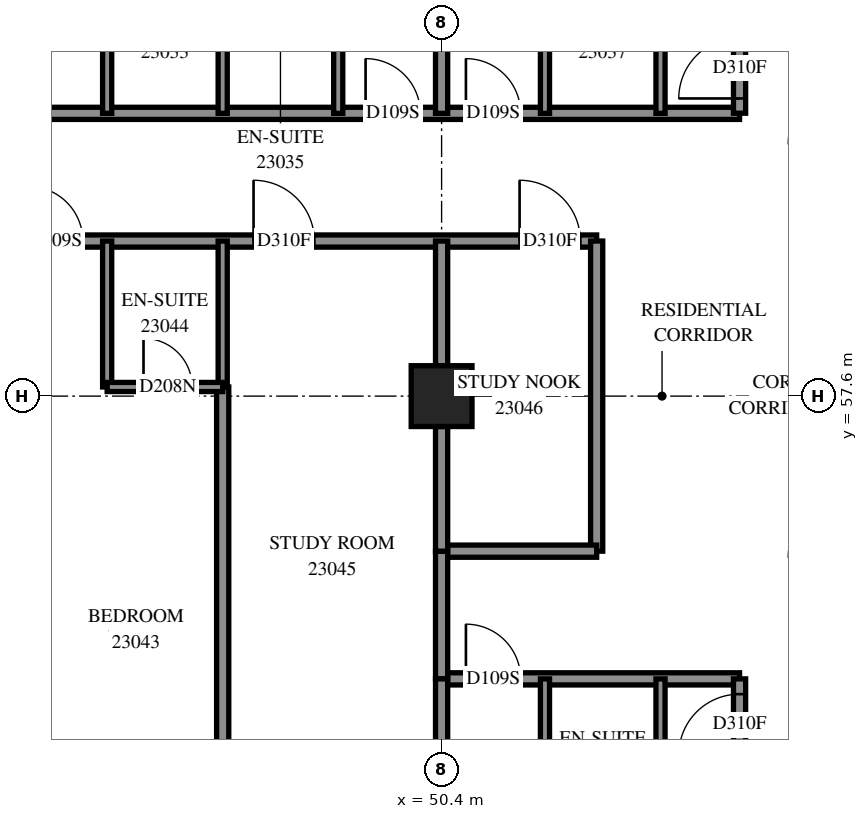
"""IFC4 building model, lengths in metres.
Left out: names, types, materials, properties, quantities, classifications, styles, units other than length and angle.
Written with IfcOpenShell. Run it as: python <this file> out.ifc"""

import sys

from ifc_helpers import new_model, si_unit, direction, frame, frame_2d, origin, origin_2d, place, context, subcontext, project, spatial, rectangle, extrude, element, fill, save


model = new_model("IFC4")
c1 = context("Model", 3, precision=1e-05, world=origin(), true_north=direction((0.0, 1.0)))
c2 = subcontext(c1, "Body", "Model", "MODEL_VIEW")
j1 = project(units=[si_unit("LENGTHUNIT", "METRE"), si_unit("PLANEANGLEUNIT", "RADIAN")], contexts=[c1])
p1 = place(None, origin())
s1 = spatial("IfcSite", under=j1, at=p1, CompositionType="ELEMENT")
p2 = place(p1, origin())
s2 = spatial("IfcBuilding", under=s1, at=p2, CompositionType="ELEMENT")
p3 = place(p2, frame((0.0, 0.0, 88.0)))
s3 = spatial("IfcBuildingStorey", under=s2, at=p3, CompositionType="ELEMENT", Elevation=88.0)
p4 = place(p3, frame((50.4, 57.6, 0.0), z_axis=(0.0, 0.0, 1.0), x_axis=(1.0, 0.0, 0.0)))
e1 = element("IfcColumn", 1, at=p4, inside=s3, PredefinedType="COLUMN", context=c2, shape_type="SweptSolid", body=[
    extrude(rectangle(XDim=1.0, YDim=1.0, at=origin_2d()), origin(), (0.0, 0.0, 1.0), 3.1),
])
p5 = place(p3, frame((28.8, 60.15, 0.0), z_axis=(0.0, 0.0, 1.0), x_axis=(1.0, 0.0, 0.0)))
e2 = element("IfcWall", 2, at=p5, inside=s3, PredefinedType="PARTITIONING", context=c2, shape_type="SweptSolid", body=[
    extrude(rectangle(XDim=24.15, YDim=0.2, at=frame_2d((12.075, 0.0))), origin(), (0.0, 0.0, 1.0), 3.1),
])
p6 = place(p5, frame((11.325, 0.0, 0.0)))
e3 = element("IfcOpeningElement", 3, at=p6, cuts=e2, PredefinedType="OPENING", context=c2, shape_type="SweptSolid", body=[
    extrude(rectangle(XDim=1.0, YDim=2.1, at=frame_2d((0.5, 1.05))), frame((0.0, 0.11, 0.0), z_axis=(0.0, -1.0, 0.0), x_axis=(1.0, 0.0, 0.0)), (0.0, 0.0, 1.0), 0.22),
])
p7 = place(p5, frame((14.8, 0.0, 0.0)))
e4 = element("IfcOpeningElement", 4, at=p7, cuts=e2, PredefinedType="OPENING", context=c2, shape_type="SweptSolid", body=[
    extrude(rectangle(XDim=0.9, YDim=2.1, at=frame_2d((0.45, 1.05))), frame((0.0, 0.11, 0.0), z_axis=(0.0, -1.0, 0.0), x_axis=(1.0, 0.0, 0.0)), (0.0, 0.0, 1.0), 0.22),
])
p8 = place(p5, frame((18.508, 0.0, 0.0)))
e5 = element("IfcOpeningElement", 5, at=p8, cuts=e2, PredefinedType="OPENING", context=c2, shape_type="SweptSolid", body=[
    extrude(rectangle(XDim=1.0, YDim=2.1, at=frame_2d((0.5, 1.05))), frame((0.0, 0.11, 0.0), z_axis=(0.0, -1.0, 0.0), x_axis=(1.0, 0.0, 0.0)), (0.0, 0.0, 1.0), 0.22),
])
p9 = place(p5, frame((22.882, 0.0, 0.0)))
e6 = element("IfcOpeningElement", 6, at=p9, cuts=e2, PredefinedType="OPENING", context=c2, shape_type="SweptSolid", body=[
    extrude(rectangle(XDim=1.0, YDim=2.1, at=frame_2d((0.5, 1.05))), frame((0.0, 0.11, 0.0), z_axis=(0.0, -1.0, 0.0), x_axis=(1.0, 0.0, 0.0)), (0.0, 0.0, 1.0), 0.22),
])
p10 = place(p3, frame((33.45, 62.25, 0.0), z_axis=(0.0, 0.0, 1.0), x_axis=(1.0, 0.0, 0.0)))
e7 = element("IfcWall", 7, at=p10, inside=s3, PredefinedType="PARTITIONING", context=c2, shape_type="SweptSolid", body=[
    extrude(rectangle(XDim=21.85, YDim=0.2, at=frame_2d((10.925, 0.0))), origin(), (0.0, 0.0, 1.0), 3.1),
])
p11 = place(p10, frame((0.144, 0.0, 0.0)))
e8 = element("IfcOpeningElement", 8, at=p11, cuts=e7, PredefinedType="OPENING", context=c2, shape_type="SweptSolid", body=[
    extrude(rectangle(XDim=1.0, YDim=2.1, at=frame_2d((0.5, 1.05))), frame((0.0, 0.11, 0.0), z_axis=(0.0, -1.0, 0.0), x_axis=(1.0, 0.0, 0.0)), (0.0, 0.0, 1.0), 0.22),
])
p12 = place(p10, frame((2.95, 0.0, 0.0)))
e9 = element("IfcOpeningElement", 9, at=p12, cuts=e7, PredefinedType="OPENING", context=c2, shape_type="SweptSolid", body=[
    extrude(rectangle(XDim=0.9, YDim=2.1, at=frame_2d((0.45, 1.05))), frame((0.0, 0.11, 0.0), z_axis=(0.0, -1.0, 0.0), x_axis=(1.0, 0.0, 0.0)), (0.0, 0.0, 1.0), 0.22),
])
p13 = place(p10, frame((8.407, 0.0, 0.0)))
e10 = element("IfcOpeningElement", 10, at=p13, cuts=e7, PredefinedType="OPENING", context=c2, shape_type="SweptSolid", body=[
    extrude(rectangle(XDim=0.9, YDim=2.1, at=frame_2d((0.45, 1.05))), frame((0.0, 0.11, 0.0), z_axis=(0.0, -1.0, 0.0), x_axis=(1.0, 0.0, 0.0)), (0.0, 0.0, 1.0), 0.22),
])
p14 = place(p10, frame((15.7, 0.0, 0.0)))
e11 = element("IfcOpeningElement", 11, at=p14, cuts=e7, PredefinedType="OPENING", context=c2, shape_type="SweptSolid", body=[
    extrude(rectangle(XDim=0.9, YDim=2.1, at=frame_2d((0.45, 1.05))), frame((0.0, 0.11, 0.0), z_axis=(0.0, -1.0, 0.0), x_axis=(1.0, 0.0, 0.0)), (0.0, 0.0, 1.0), 0.22),
])
p15 = place(p10, frame((17.35, 0.0, 0.0)))
e12 = element("IfcOpeningElement", 12, at=p15, cuts=e7, PredefinedType="OPENING", context=c2, shape_type="SweptSolid", body=[
    extrude(rectangle(XDim=0.9, YDim=2.1, at=frame_2d((0.45, 1.05))), frame((0.0, 0.11, 0.0), z_axis=(0.0, -1.0, 0.0), x_axis=(1.0, 0.0, 0.0)), (0.0, 0.0, 1.0), 0.22),
])
p16 = place(p3, frame((46.8, 49.75, 0.0), z_axis=(0.0, 0.0, 1.0), x_axis=(0.0, 1.0, 0.0)))
e13 = element("IfcWall", 13, at=p16, inside=s3, PredefinedType="PARTITIONING", context=c2, shape_type="SweptSolid", body=[
    extrude(rectangle(XDim=8.0, YDim=0.2, at=frame_2d((4.0, 0.0))), origin(), (0.0, 0.0, 1.0), 3.1),
])
p17 = place(p3, frame((52.95, 55.05, 0.0), z_axis=(0.0, 0.0, 1.0), x_axis=(0.0, 1.0, 0.0)))
e14 = element("IfcWall", 14, at=p17, inside=s3, PredefinedType="PARTITIONING", context=c2, shape_type="SweptSolid", body=[
    extrude(rectangle(XDim=5.1, YDim=0.2, at=frame_2d((2.55, 0.0))), origin(), (0.0, 0.0, 1.0), 3.1),
])
p18 = place(p3, frame((50.4, 52.95, 0.0), z_axis=(0.0, 0.0, 1.0), x_axis=(1.0, 0.0, 0.0)))
e15 = element("IfcWall", 15, at=p18, inside=s3, PredefinedType="PARTITIONING", context=c2, shape_type="SweptSolid", body=[
    extrude(rectangle(XDim=4.9, YDim=0.2, at=frame_2d((2.45, 0.0))), origin(), (0.0, 0.0, 1.0), 3.1),
])
p19 = place(p18, frame((0.4, 0.0, 0.0)))
e16 = element("IfcOpeningElement", 16, at=p19, cuts=e15, PredefinedType="OPENING", context=c2, shape_type="SweptSolid", body=[
    extrude(rectangle(XDim=0.9, YDim=2.1, at=frame_2d((0.45, 1.05))), frame((0.0, 0.11, 0.0), z_axis=(0.0, -1.0, 0.0), x_axis=(1.0, 0.0, 0.0)), (0.0, 0.0, 1.0), 0.22),
])
p20 = place(p3, frame((55.3, 48.1, 0.0), z_axis=(0.0, 0.0, 1.0), x_axis=(0.0, 1.0, 0.0)))
e17 = element("IfcWall", 17, at=p20, inside=s3, PredefinedType="PARTITIONING", context=c2, shape_type="SweptSolid", body=[
    extrude(rectangle(XDim=4.85, YDim=0.2, at=frame_2d((2.425, 0.0))), origin(), (0.0, 0.0, 1.0), 3.1),
])
p21 = place(p20, frame((3.599, 0.0, 0.0)))
e18 = element("IfcOpeningElement", 18, at=p21, cuts=e17, PredefinedType="OPENING", context=c2, shape_type="SweptSolid", body=[
    extrude(rectangle(XDim=1.0, YDim=2.1, at=frame_2d((0.5, 1.05))), frame((0.0, 0.11, 0.0), z_axis=(0.0, -1.0, 0.0), x_axis=(1.0, 0.0, 0.0)), (0.0, 0.0, 1.0), 0.22),
])
p22 = place(p3, frame((55.3, 62.252, 0.0), z_axis=(0.0, 0.0, 1.0), x_axis=(0.0, 1.0, 0.0)))
e19 = element("IfcWall", 19, at=p22, inside=s3, PredefinedType="PARTITIONING", context=c2, shape_type="SweptSolid", body=[
    extrude(rectangle(XDim=4.848, YDim=0.2, at=frame_2d((2.424, 0.0))), origin(), (0.0, 0.0, 1.0), 3.1),
])
p23 = place(p22, frame((0.243, 0.0, 0.0)))
e20 = element("IfcOpeningElement", 20, at=p23, cuts=e19, PredefinedType="OPENING", context=c2, shape_type="SweptSolid", body=[
    extrude(rectangle(XDim=1.0, YDim=2.1, at=frame_2d((0.5, 1.05))), frame((0.0, 0.11, 0.0), z_axis=(0.0, -1.0, 0.0), x_axis=(1.0, 0.0, 0.0)), (0.0, 0.0, 1.0), 0.22),
])
p24 = place(p3, frame((50.4, 55.05, 0.0), z_axis=(0.0, 0.0, 1.0), x_axis=(1.0, 0.0, 0.0)))
e21 = element("IfcWall", 21, at=p24, inside=s3, PredefinedType="PARTITIONING", context=c2, shape_type="SweptSolid", body=[
    extrude(rectangle(XDim=2.55, YDim=0.2, at=frame_2d((1.275, 0.0))), origin(), (0.0, 0.0, 1.0), 3.1),
])
for number, where, z_axis, x_axis in (
    (22, (44.9, 62.25, 0.0), (0.0, 0.0, 1.0), (0.0, 1.0, 0.0)),
    (23, (46.8, 62.25, 0.0), (0.0, 0.0, 1.0), (0.0, 1.0, 0.0)),
    (24, (48.7, 62.25, 0.0), (0.0, 0.0, 1.0), (0.0, 1.0, 0.0)),
    (25, (52.1, 50.55, 0.0), (0.0, 0.0, 1.0), (0.0, 1.0, 0.0)),
    (26, (52.1, 62.25, 0.0), (0.0, 0.0, 1.0), (0.0, 1.0, 0.0)),
    (27, (54.0, 50.55, 0.0), (0.0, 0.0, 1.0), (0.0, 1.0, 0.0)),
    (28, (54.0, 62.25, 0.0), (0.0, 0.0, 1.0), (0.0, 1.0, 0.0)),
    (29, (44.9, 57.75, 0.0), (0.0, 0.0, 1.0), (0.0, 1.0, 0.0)),
    (30, (46.8, 57.75, 0.0), (0.0, 0.0, 1.0), (0.0, 1.0, 0.0)),
):
    element("IfcWall", number, at=place(p3, frame(where, z_axis=z_axis, x_axis=x_axis)), inside=s3, PredefinedType="PARTITIONING", context=c2, shape_type="SweptSolid", body=[
        extrude(rectangle(XDim=2.4, YDim=0.15, at=frame_2d((1.2, 0.0))), origin(), (0.0, 0.0, 1.0), 3.1),
    ])
p25 = place(p3, frame((50.4, 52.95, 0.0), z_axis=(0.0, 0.0, 1.0), x_axis=(0.0, 1.0, 0.0)))
e31 = element("IfcWall", 31, at=p25, inside=s3, PredefinedType="PARTITIONING", context=c2, shape_type="SweptSolid", body=[
    extrude(rectangle(XDim=2.1, YDim=0.2, at=frame_2d((1.05, 0.0))), origin(), (0.0, 0.0, 1.0), 3.1),
])
for number, where, z_axis, x_axis in (
    (32, (50.4, 50.9, 0.0), (0.0, 0.0, 1.0), (0.0, 1.0, 0.0)),
    (33, (50.4, 55.05, 0.0), (0.0, 0.0, 1.0), (0.0, 1.0, 0.0)),
    (34, (50.4, 58.1, 0.0), (0.0, 0.0, 1.0), (0.0, 1.0, 0.0)),
    (35, (50.4, 62.25, 0.0), (0.0, 0.0, 1.0), (0.0, 1.0, 0.0)),
):
    element("IfcWall", number, at=place(p3, frame(where, z_axis=z_axis, x_axis=x_axis)), inside=s3, PredefinedType="PARTITIONING", context=c2, shape_type="SweptSolid", body=[
        extrude(rectangle(XDim=2.05, YDim=0.2, at=frame_2d((1.025, 0.0))), origin(), (0.0, 0.0, 1.0), 3.1),
    ])
p26 = place(p3, frame((44.9, 57.75, 0.0), z_axis=(0.0, 0.0, 1.0), x_axis=(1.0, 0.0, 0.0)))
e36 = element("IfcWall", 36, at=p26, inside=s3, PredefinedType="PARTITIONING", context=c2, shape_type="SweptSolid", body=[
    extrude(rectangle(XDim=1.9, YDim=0.15, at=frame_2d((0.95, 0.0))), origin(), (0.0, 0.0, 1.0), 3.1),
])
p27 = place(p26, frame((0.598, 0.0, 0.0)))
e37 = element("IfcOpeningElement", 37, at=p27, cuts=e36, PredefinedType="OPENING", context=c2, shape_type="SweptSolid", body=[
    extrude(rectangle(XDim=0.8, YDim=2.1, at=frame_2d((0.4, 1.05))), frame((0.0, 0.085, 0.0), z_axis=(0.0, -1.0, 0.0), x_axis=(1.0, 0.0, 0.0)), (0.0, 0.0, 1.0), 0.17),
])
p28 = place(p14, origin())
e38 = element("IfcDoor", 38, at=p28, inside=s3, OperationType="SINGLE_SWING_LEFT", PredefinedType="DOOR", context=c2, shape_type="SweptSolid", body=[
    extrude(rectangle(XDim=0.9, YDim=2.1, at=frame_2d((0.45, 1.05))), frame((0.0, 0.025, 0.0), z_axis=(0.0, -1.0, 0.0), x_axis=(1.0, 0.0, 0.0)), (0.0, 0.0, 1.0), 0.05),
])
fill(e11, e38)
p29 = place(p15, origin())
e39 = element("IfcDoor", 39, at=p29, inside=s3, OperationType="SINGLE_SWING_RIGHT", PredefinedType="DOOR", context=c2, shape_type="SweptSolid", body=[
    extrude(rectangle(XDim=0.9, YDim=2.1, at=frame_2d((0.45, 1.05))), frame((0.0, 0.025, 0.0), z_axis=(0.0, -1.0, 0.0), x_axis=(1.0, 0.0, 0.0)), (0.0, 0.0, 1.0), 0.05),
])
fill(e12, e39)
p30 = place(p23, origin())
e40 = element("IfcDoor", 40, at=p30, inside=s3, OperationType="SINGLE_SWING_LEFT", PredefinedType="DOOR", context=c2, shape_type="SweptSolid", body=[
    extrude(rectangle(XDim=1.0, YDim=2.1, at=frame_2d((0.5, 1.05))), frame((0.0, 0.025, 0.0), z_axis=(0.0, -1.0, 0.0), x_axis=(1.0, 0.0, 0.0)), (0.0, 0.0, 1.0), 0.05),
])
fill(e20, e40)
p31 = place(p7, origin())
e41 = element("IfcDoor", 41, at=p31, inside=s3, OperationType="SINGLE_SWING_LEFT", PredefinedType="DOOR", context=c2, shape_type="SweptSolid", body=[
    extrude(rectangle(XDim=0.9, YDim=2.1, at=frame_2d((0.45, 1.05))), frame((0.0, 0.025, 0.0), z_axis=(0.0, -1.0, 0.0), x_axis=(1.0, 0.0, 0.0)), (0.0, 0.0, 1.0), 0.05),
])
fill(e4, e41)
p32 = place(p27, origin())
e42 = element("IfcDoor", 42, at=p32, inside=s3, OperationType="SINGLE_SWING_RIGHT", PredefinedType="DOOR", context=c2, shape_type="SweptSolid", body=[
    extrude(rectangle(XDim=0.8, YDim=2.1, at=frame_2d((0.4, 1.05))), frame((0.0, 0.025, 0.0), z_axis=(0.0, -1.0, 0.0), x_axis=(1.0, 0.0, 0.0)), (0.0, 0.0, 1.0), 0.05),
])
fill(e37, e42)
p33 = place(p8, origin())
e43 = element("IfcDoor", 43, at=p33, inside=s3, OperationType="SINGLE_SWING_RIGHT", PredefinedType="DOOR", context=c2, shape_type="SweptSolid", body=[
    extrude(rectangle(XDim=1.0, YDim=2.1, at=frame_2d((0.5, 1.05))), frame((0.0, 0.025, 0.0), z_axis=(0.0, -1.0, 0.0), x_axis=(1.0, 0.0, 0.0)), (0.0, 0.0, 1.0), 0.05),
])
fill(e5, e43)
p34 = place(p9, origin())
e44 = element("IfcDoor", 44, at=p34, inside=s3, OperationType="SINGLE_SWING_LEFT", PredefinedType="DOOR", context=c2, shape_type="SweptSolid", body=[
    extrude(rectangle(XDim=1.0, YDim=2.1, at=frame_2d((0.5, 1.05))), frame((0.0, 0.025, 0.0), z_axis=(0.0, -1.0, 0.0), x_axis=(1.0, 0.0, 0.0)), (0.0, 0.0, 1.0), 0.05),
])
fill(e6, e44)
p35 = place(p19, origin())
e45 = element("IfcDoor", 45, at=p35, inside=s3, OperationType="SINGLE_SWING_LEFT", PredefinedType="DOOR", context=c2, shape_type="SweptSolid", body=[
    extrude(rectangle(XDim=0.9, YDim=2.1, at=frame_2d((0.45, 1.05))), frame((0.0, 0.025, 0.0), z_axis=(0.0, -1.0, 0.0), x_axis=(1.0, 0.0, 0.0)), (0.0, 0.0, 1.0), 0.05),
])
fill(e16, e45)
p36 = place(p21, origin())
e46 = element("IfcDoor", 46, at=p36, inside=s3, OperationType="SINGLE_SWING_RIGHT", PredefinedType="DOOR", context=c2, shape_type="SweptSolid", body=[
    extrude(rectangle(XDim=1.0, YDim=2.1, at=frame_2d((0.5, 1.05))), frame((0.0, 0.025, 0.0), z_axis=(0.0, -1.0, 0.0), x_axis=(1.0, 0.0, 0.0)), (0.0, 0.0, 1.0), 0.05),
])
fill(e18, e46)
save(model, sys.argv[1])
